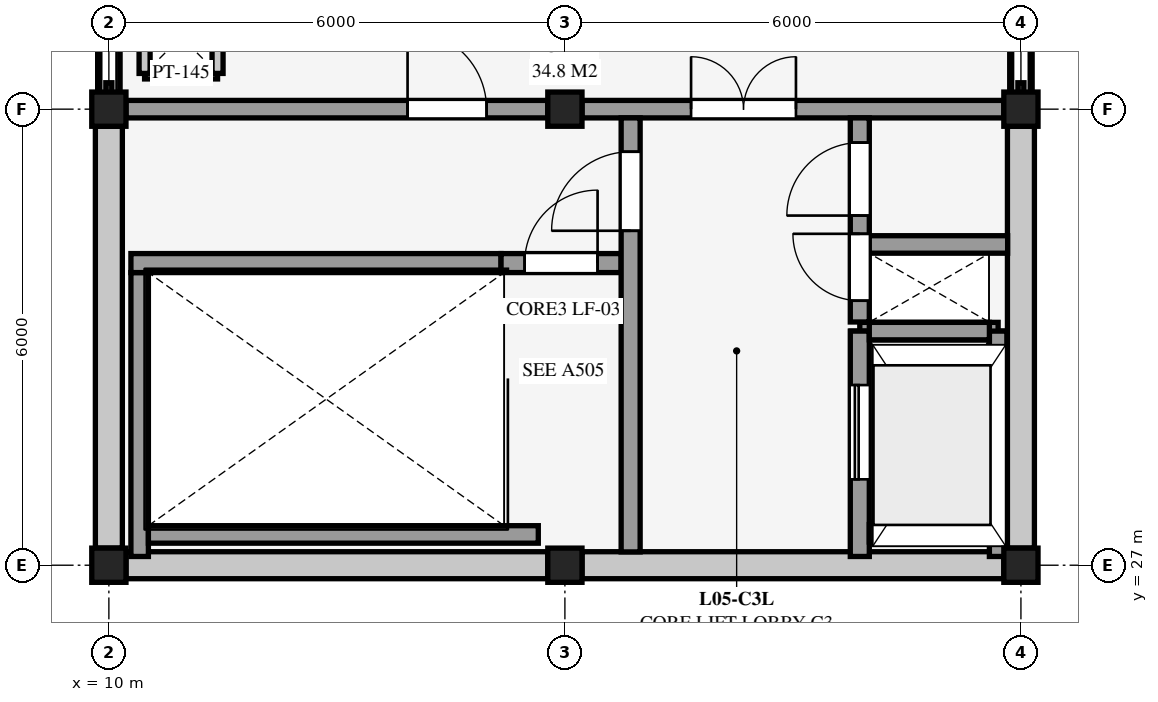
"""IFC4 building model, lengths in metres.
Left out: names, types, materials, properties, quantities, classifications, styles, units other than length and angle.
Written with IfcOpenShell. Run it as: python <this file> out.ifc"""

import sys

from ifc_helpers import new_model, si_unit, direction, frame, frame_2d, origin, origin_2d, place, context, subcontext, project, spatial, rectangle, extrude, element, fill, save


model = new_model("IFC4")
c1 = context("Model", 3, precision=1e-05, world=origin(), true_north=direction((0.0, 1.0)))
c2 = subcontext(c1, "Body", "Model", "MODEL_VIEW")
j1 = project(units=[si_unit("LENGTHUNIT", "METRE"), si_unit("PLANEANGLEUNIT", "RADIAN")], contexts=[c1])
p1 = place(None, origin())
s1 = spatial("IfcSite", under=j1, at=p1, CompositionType="ELEMENT")
p2 = place(p1, origin())
s2 = spatial("IfcBuilding", under=s1, at=p2, CompositionType="ELEMENT")
p3 = place(p2, frame((0.0, 0.0, 18.0)))
s3 = spatial("IfcBuildingStorey", under=s2, at=p3, CompositionType="ELEMENT", Elevation=18.0)
for number, where, z_axis, x_axis in (
    (1, (10.0, 27.0, 0.0), (0.0, 0.0, 1.0), (1.0, 0.0, 0.0)),
    (2, (10.0, 33.0, 0.0), (0.0, 0.0, 1.0), (1.0, 0.0, 0.0)),
    (3, (16.0, 27.0, 0.0), (0.0, 0.0, 1.0), (1.0, 0.0, 0.0)),
    (4, (16.0, 33.0, 0.0), (0.0, 0.0, 1.0), (1.0, 0.0, 0.0)),
    (5, (22.0, 27.0, 0.0), (0.0, 0.0, 1.0), (1.0, 0.0, 0.0)),
    (6, (22.0, 33.0, 0.0), (0.0, 0.0, 1.0), (1.0, 0.0, 0.0)),
):
    element("IfcColumn", number, at=place(p3, frame(where, z_axis=z_axis, x_axis=x_axis)), inside=s3, PredefinedType="COLUMN", context=c2, shape_type="SweptSolid", body=[
        extrude(rectangle(XDim=0.45, YDim=0.45, at=origin_2d()), origin(), (0.0, 0.0, 1.0), 4.5),
    ])
p4 = place(p3, frame((15.775, 27.0, 0.0), z_axis=(0.0, 0.0, 1.0), x_axis=(-1.0, 0.0, 0.0)))
e7 = element("IfcWall", 7, at=p4, inside=s3, PredefinedType="SOLIDWALL", context=c2, shape_type="SweptSolid", body=[
    extrude(rectangle(XDim=5.55, YDim=0.355, at=frame_2d((2.775, 0.0))), origin(), (0.0, 0.0, 1.0), 4.248),
])
p5 = place(p3, frame((21.775, 27.0, 0.0), z_axis=(0.0, 0.0, 1.0), x_axis=(-1.0, 0.0, 0.0)))
e8 = element("IfcWall", 8, at=p5, inside=s3, PredefinedType="SOLIDWALL", context=c2, shape_type="SweptSolid", body=[
    extrude(rectangle(XDim=5.55, YDim=0.355, at=frame_2d((2.775, 0.0))), origin(), (0.0, 0.0, 1.0), 4.087),
])
for number, where, z_axis, x_axis in (
    (9, (10.0, 27.225, 0.0), (0.0, 0.0, 1.0), (0.0, 1.0, 0.0)),
    (10, (22.0, 32.775, 0.0), (0.0, 0.0, 1.0), (0.0, -1.0, 0.0)),
):
    element("IfcWall", number, at=place(p3, frame(where, z_axis=z_axis, x_axis=x_axis)), inside=s3, PredefinedType="SOLIDWALL", context=c2, shape_type="SweptSolid", body=[
        extrude(rectangle(XDim=5.55, YDim=0.355, at=frame_2d((2.775, 0.0))), origin(), (0.0, 0.0, 1.0), 4.093),
    ])
p6 = place(p3, frame((10.0, 33.225, 0.0), z_axis=(0.0, 0.0, 1.0), x_axis=(0.0, 1.0, 0.0)))
e11 = element("IfcWall", 11, at=p6, inside=s3, PredefinedType="SOLIDWALL", context=c2, shape_type="SweptSolid", body=[
    extrude(rectangle(XDim=5.55, YDim=0.295, at=frame_2d((2.775, 0.0))), origin(), (0.0, 0.0, 1.0), 0.52),
])
p7 = place(p3, frame((22.0, 38.775, 0.0), z_axis=(0.0, 0.0, 1.0), x_axis=(0.0, -1.0, 0.0)))
e12 = element("IfcWall", 12, at=p7, inside=s3, PredefinedType="SOLIDWALL", context=c2, shape_type="SweptSolid", body=[
    extrude(rectangle(XDim=5.55, YDim=0.295, at=frame_2d((2.775, 0.0))), origin(), (0.0, 0.0, 1.0), 0.16),
])
for number, where, z_axis, x_axis in (
    (13, (10.47, 33.47, 0.0), (0.0, 0.0, 1.0), (1.0, 0.0, 0.0)),
    (14, (11.43, 33.47, 0.0), (0.0, 0.0, 1.0), (0.0, 1.0, 0.0)),
    (15, (10.47, 34.43, 0.0), (0.0, 0.0, 1.0), (0.0, -1.0, 0.0)),
):
    element("IfcWall", number, at=place(p3, frame(where, z_axis=z_axis, x_axis=x_axis)), inside=s3, PredefinedType="PARTITIONING", context=c2, shape_type="SweptSolid", body=[
        extrude(rectangle(XDim=0.96, YDim=0.145, at=frame_2d((0.48, 0.0))), origin(), (0.0, 0.0, 1.0), 4.24),
    ])
p8 = place(p3, frame((19.88, 27.42, 4.5), z_axis=(0.0, 0.0, 1.0), x_axis=(1.0, 0.0, 0.0)))
e16 = element("IfcWall", 16, at=p8, inside=s3, PredefinedType="SHEAR", context=c2, shape_type="SweptSolid", body=[
    extrude(rectangle(XDim=1.82, YDim=0.23, at=frame_2d((0.91, 0.0))), origin(), (0.0, 0.0, 1.0), 1.25),
])
p9 = place(p3, frame((21.7, 27.42, 4.5), z_axis=(0.0, 0.0, 1.0), x_axis=(0.0, 1.0, 0.0)))
e17 = element("IfcWall", 17, at=p9, inside=s3, PredefinedType="SHEAR", context=c2, shape_type="SweptSolid", body=[
    extrude(rectangle(XDim=2.66, YDim=0.23, at=frame_2d((1.33, 0.0))), origin(), (0.0, 0.0, 1.0), 1.25),
])
p10 = place(p3, frame((21.7, 30.08, 4.5), z_axis=(0.0, 0.0, 1.0), x_axis=(-1.0, 0.0, 0.0)))
e18 = element("IfcWall", 18, at=p10, inside=s3, PredefinedType="SHEAR", context=c2, shape_type="SweptSolid", body=[
    extrude(rectangle(XDim=1.82, YDim=0.23, at=frame_2d((0.91, 0.0))), origin(), (0.0, 0.0, 1.0), 1.25),
])
p11 = place(p3, frame((19.88, 30.08, 4.5), z_axis=(0.0, 0.0, 1.0), x_axis=(0.0, -1.0, 0.0)))
e19 = element("IfcWall", 19, at=p11, inside=s3, PredefinedType="SHEAR", context=c2, shape_type="SweptSolid", body=[
    extrude(rectangle(XDim=2.66, YDim=0.23, at=frame_2d((1.33, 0.0))), origin(), (0.0, 0.0, 1.0), 1.25),
])
p12 = place(p3, frame((10.225, 33.0, 0.0), z_axis=(0.0, 0.0, 1.0), x_axis=(1.0, 0.0, 0.0)))
e20 = element("IfcWall", 20, at=p12, inside=s3, PredefinedType="SHEAR", context=c2, shape_type="SweptSolid", body=[
    extrude(rectangle(XDim=5.55, YDim=0.23, at=frame_2d((2.775, 0.0))), origin(), (0.0, 0.0, 1.0), 4.24),
])
p13 = place(p12, frame((3.705, 0.0, 0.0)))
e21 = element("IfcOpeningElement", 21, at=p13, cuts=e20, PredefinedType="OPENING", context=c2, shape_type="SweptSolid", body=[
    extrude(rectangle(XDim=1.04, YDim=2.14, at=frame_2d((0.52, 1.07))), frame((0.0, 0.125, 0.0), z_axis=(0.0, -1.0, 0.0), x_axis=(1.0, 0.0, 0.0)), (0.0, 0.0, 1.0), 0.25),
])
p14 = place(p3, frame((16.225, 33.0, 0.0), z_axis=(0.0, 0.0, 1.0), x_axis=(1.0, 0.0, 0.0)))
e22 = element("IfcWall", 22, at=p14, inside=s3, PredefinedType="SHEAR", context=c2, shape_type="SweptSolid", body=[
    extrude(rectangle(XDim=5.55, YDim=0.23, at=frame_2d((2.775, 0.0))), origin(), (0.0, 0.0, 1.0), 4.24),
])
p15 = place(p14, frame((1.435, 0.0, 0.0)))
e23 = element("IfcOpeningElement", 23, at=p15, cuts=e22, PredefinedType="OPENING", context=c2, shape_type="SweptSolid", body=[
    extrude(rectangle(XDim=1.38, YDim=2.16, at=frame_2d((0.69, 1.08))), frame((0.0, 0.125, 0.0), z_axis=(0.0, -1.0, 0.0), x_axis=(1.0, 0.0, 0.0)), (0.0, 0.0, 1.0), 0.25),
])
p16 = place(p3, frame((10.405, 27.115, 0.0), z_axis=(0.0, 0.0, 1.0), x_axis=(0.0, 1.0, 0.0)))
e24 = element("IfcWall", 24, at=p16, inside=s3, PredefinedType="SHEAR", context=c2, shape_type="SweptSolid", body=[
    extrude(rectangle(XDim=3.735, YDim=0.23, at=frame_2d((1.868, 0.0))), origin(), (0.0, 0.0, 1.0), 4.5),
])
p17 = place(p3, frame((10.52, 27.405, 0.0), z_axis=(0.0, 0.0, 1.0), x_axis=(1.0, 0.0, 0.0)))
e25 = element("IfcWall", 25, at=p17, inside=s3, PredefinedType="SHEAR", context=c2, shape_type="SweptSolid", body=[
    extrude(rectangle(XDim=5.13, YDim=0.23, at=frame_2d((2.565, 0.0))), origin(), (0.0, 0.0, 1.0), 4.5),
])
p18 = place(p3, frame((10.29, 30.975, 0.0), z_axis=(0.0, 0.0, 1.0), x_axis=(1.0, 0.0, 0.0)))
e26 = element("IfcWall", 26, at=p18, inside=s3, PredefinedType="SHEAR", context=c2, shape_type="SweptSolid", body=[
    extrude(rectangle(XDim=4.87, YDim=0.25, at=frame_2d((2.435, 0.0))), origin(), (0.0, 0.0, 1.0), 4.5),
])
p19 = place(p3, frame((15.16, 30.975, 0.0), z_axis=(0.0, 0.0, 1.0), x_axis=(1.0, 0.0, 0.0)))
e27 = element("IfcWall", 27, at=p19, inside=s3, PredefinedType="SHEAR", context=c2, shape_type="SweptSolid", body=[
    extrude(rectangle(XDim=1.58, YDim=0.25, at=frame_2d((0.79, 0.0))), origin(), (0.0, 0.0, 1.0), 4.24),
])
p20 = place(p19, frame((0.31, 0.0, 0.0)))
e28 = element("IfcOpeningElement", 28, at=p20, cuts=e27, PredefinedType="OPENING", context=c2, shape_type="SweptSolid", body=[
    extrude(rectangle(XDim=0.96, YDim=2.12, at=frame_2d((0.48, 1.06))), frame((0.0, 0.135, 0.0), z_axis=(0.0, -1.0, 0.0), x_axis=(1.0, 0.0, 0.0)), (0.0, 0.0, 1.0), 0.27),
])
p21 = place(p3, frame((16.865, 27.175, 0.0), z_axis=(0.0, 0.0, 1.0), x_axis=(0.0, 1.0, 0.0)))
e29 = element("IfcWall", 29, at=p21, inside=s3, PredefinedType="SHEAR", context=c2, shape_type="SweptSolid", body=[
    extrude(rectangle(XDim=5.71, YDim=0.25, at=frame_2d((2.855, 0.0))), origin(), (0.0, 0.0, 1.0), 4.24),
])
p22 = place(p21, frame((4.225, 0.0, 0.0)))
e30 = element("IfcOpeningElement", 30, at=p22, cuts=e29, PredefinedType="OPENING", context=c2, shape_type="SweptSolid", body=[
    extrude(rectangle(XDim=1.04, YDim=2.14, at=frame_2d((0.52, 1.07))), frame((0.0, 0.135, 0.0), z_axis=(0.0, -1.0, 0.0), x_axis=(1.0, 0.0, 0.0)), (0.0, 0.0, 1.0), 0.27),
])
p23 = place(p3, frame((19.88, 27.115, 0.0), z_axis=(0.0, 0.0, 1.0), x_axis=(0.0, 1.0, 0.0)))
e31 = element("IfcWall", 31, at=p23, inside=s3, PredefinedType="SHEAR", context=c2, shape_type="SweptSolid", body=[
    extrude(rectangle(XDim=2.965, YDim=0.25, at=frame_2d((1.482, 0.0))), origin(), (0.0, 0.0, 1.0), 4.5),
])
p24 = place(p23, frame((1.015, 0.0, 0.0)))
e32 = element("IfcOpeningElement", 32, at=p24, cuts=e31, PredefinedType="OPENING", context=c2, shape_type="SweptSolid", body=[
    extrude(rectangle(XDim=1.24, YDim=2.2, at=frame_2d((0.62, 1.1))), frame((0.0, 0.135, 0.0), z_axis=(0.0, -1.0, 0.0), x_axis=(1.0, 0.0, 0.0)), (0.0, 0.0, 1.0), 0.27),
])
p25 = place(p3, frame((20.005, 27.42, 0.0), z_axis=(0.0, 0.0, 1.0), x_axis=(1.0, 0.0, 0.0)))
e33 = element("IfcWall", 33, at=p25, inside=s3, PredefinedType="SHEAR", context=c2, shape_type="SweptSolid", body=[
    extrude(rectangle(XDim=1.58, YDim=0.23, at=frame_2d((0.79, 0.0))), origin(), (0.0, 0.0, 1.0), 4.5),
])
p26 = place(p3, frame((21.7, 27.115, 0.0), z_axis=(0.0, 0.0, 1.0), x_axis=(0.0, 1.0, 0.0)))
e34 = element("IfcWall", 34, at=p26, inside=s3, PredefinedType="SHEAR", context=c2, shape_type="SweptSolid", body=[
    extrude(rectangle(XDim=2.965, YDim=0.23, at=frame_2d((1.482, 0.0))), origin(), (0.0, 0.0, 1.0), 4.5),
])
p27 = place(p3, frame((20.005, 30.08, 0.0), z_axis=(0.0, 0.0, 1.0), x_axis=(1.0, 0.0, 0.0)))
e35 = element("IfcWall", 35, at=p27, inside=s3, PredefinedType="SHEAR", context=c2, shape_type="SweptSolid", body=[
    extrude(rectangle(XDim=1.58, YDim=0.23, at=frame_2d((0.79, 0.0))), origin(), (0.0, 0.0, 1.0), 4.5),
])
p28 = place(p3, frame((19.88, 30.2, 0.0), z_axis=(0.0, 0.0, 1.0), x_axis=(0.0, 1.0, 0.0)))
e36 = element("IfcWall", 36, at=p28, inside=s3, PredefinedType="SHEAR", context=c2, shape_type="SweptSolid", body=[
    extrude(rectangle(XDim=2.685, YDim=0.25, at=frame_2d((1.343, 0.0))), origin(), (0.0, 0.0, 1.0), 4.24),
])
p29 = place(p28, frame((0.28, 0.0, 0.0)))
e37 = element("IfcOpeningElement", 37, at=p29, cuts=e36, PredefinedType="OPENING", context=c2, shape_type="SweptSolid", body=[
    extrude(rectangle(XDim=0.88, YDim=2.08, at=frame_2d((0.44, 1.04))), frame((0.0, 0.135, 0.0), z_axis=(0.0, -1.0, 0.0), x_axis=(1.0, 0.0, 0.0)), (0.0, 0.0, 1.0), 0.27),
])
p30 = place(p28, frame((1.4, 0.0, 0.0)))
e38 = element("IfcOpeningElement", 38, at=p30, cuts=e36, PredefinedType="OPENING", context=c2, shape_type="SweptSolid", body=[
    extrude(rectangle(XDim=0.96, YDim=2.12, at=frame_2d((0.48, 1.06))), frame((0.0, 0.135, 0.0), z_axis=(0.0, -1.0, 0.0), x_axis=(1.0, 0.0, 0.0)), (0.0, 0.0, 1.0), 0.27),
])
p31 = place(p3, frame((20.005, 31.22, 0.0), z_axis=(0.0, 0.0, 1.0), x_axis=(1.0, 0.0, 0.0)))
e39 = element("IfcWall", 39, at=p31, inside=s3, PredefinedType="SHEAR", context=c2, shape_type="SweptSolid", body=[
    extrude(rectangle(XDim=1.82, YDim=0.23, at=frame_2d((0.91, 0.0))), origin(), (0.0, 0.0, 1.0), 4.24),
])
p32 = place(p13, origin())
e40 = element("IfcDoor", 40, at=p32, inside=s3, OperationType="SINGLE_SWING_LEFT", PredefinedType="DOOR", context=c2, shape_type="SweptSolid", body=[
    extrude(rectangle(XDim=1.04, YDim=2.14, at=frame_2d((0.52, 1.07))), frame((0.0, 0.025, 0.0), z_axis=(0.0, -1.0, 0.0), x_axis=(1.0, 0.0, 0.0)), (0.0, 0.0, 1.0), 0.05),
])
fill(e21, e40)
p33 = place(p15, origin())
e41 = element("IfcDoor", 41, at=p33, inside=s3, OperationType="DOUBLE_DOOR_SINGLE_SWING", PredefinedType="DOOR", context=c2, shape_type="SweptSolid", body=[
    extrude(rectangle(XDim=1.38, YDim=2.16, at=frame_2d((0.69, 1.08))), frame((0.0, 0.025, 0.0), z_axis=(0.0, -1.0, 0.0), x_axis=(1.0, 0.0, 0.0)), (0.0, 0.0, 1.0), 0.05),
])
fill(e23, e41)
p34 = place(p20, origin())
e42 = element("IfcDoor", 42, at=p34, inside=s3, OperationType="SINGLE_SWING_RIGHT", PredefinedType="DOOR", context=c2, shape_type="SweptSolid", body=[
    extrude(rectangle(XDim=0.96, YDim=2.12, at=frame_2d((0.48, 1.06))), frame((0.0, 0.025, 0.0), z_axis=(0.0, -1.0, 0.0), x_axis=(1.0, 0.0, 0.0)), (0.0, 0.0, 1.0), 0.05),
])
fill(e28, e42)
p35 = place(p22, origin())
e43 = element("IfcDoor", 43, at=p35, inside=s3, OperationType="SINGLE_SWING_LEFT", PredefinedType="DOOR", context=c2, shape_type="SweptSolid", body=[
    extrude(rectangle(XDim=1.04, YDim=2.14, at=frame_2d((0.52, 1.07))), frame((0.0, 0.025, 0.0), z_axis=(0.0, -1.0, 0.0), x_axis=(1.0, 0.0, 0.0)), (0.0, 0.0, 1.0), 0.05),
])
fill(e30, e43)
p36 = place(p24, origin())
e44 = element("IfcDoor", 44, at=p36, inside=s3, OperationType="SLIDING_TO_LEFT", PredefinedType="DOOR", context=c2, shape_type="SweptSolid", body=[
    extrude(rectangle(XDim=1.24, YDim=2.2, at=frame_2d((0.62, 1.1))), frame((0.0, 0.025, 0.0), z_axis=(0.0, -1.0, 0.0), x_axis=(1.0, 0.0, 0.0)), (0.0, 0.0, 1.0), 0.05),
])
fill(e32, e44)
p37 = place(p29, origin())
e45 = element("IfcDoor", 45, at=p37, inside=s3, OperationType="SINGLE_SWING_RIGHT", PredefinedType="DOOR", context=c2, shape_type="SweptSolid", body=[
    extrude(rectangle(XDim=0.88, YDim=2.08, at=frame_2d((0.44, 1.04))), frame((0.0, 0.025, 0.0), z_axis=(0.0, -1.0, 0.0), x_axis=(1.0, 0.0, 0.0)), (0.0, 0.0, 1.0), 0.05),
])
fill(e37, e45)
p38 = place(p30, origin())
e46 = element("IfcDoor", 46, at=p38, inside=s3, OperationType="SINGLE_SWING_LEFT", PredefinedType="DOOR", context=c2, shape_type="SweptSolid", body=[
    extrude(rectangle(XDim=0.96, YDim=2.12, at=frame_2d((0.48, 1.06))), frame((0.0, 0.025, 0.0), z_axis=(0.0, -1.0, 0.0), x_axis=(1.0, 0.0, 0.0)), (0.0, 0.0, 1.0), 0.05),
])
fill(e38, e46)
save(model, sys.argv[1])
